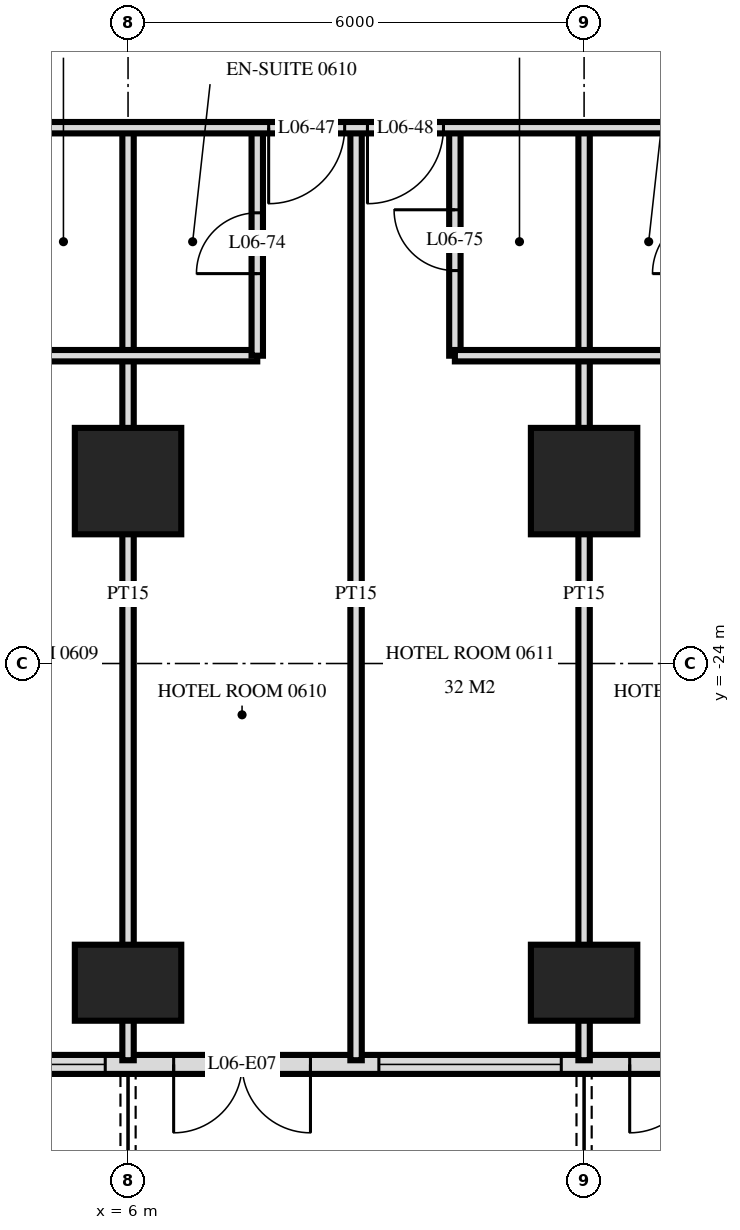
"""IFC4 building model, lengths in metres.
Left out: names, types, materials, properties, quantities, classifications, styles, units other than length and angle.
Written with IfcOpenShell. Run it as: python <this file> out.ifc"""

import sys

from ifc_helpers import new_model, si_unit, direction, frame, frame_2d, origin, origin_2d, place, context, subcontext, project, spatial, rectangle, extrude, element, fill, save


model = new_model("IFC4")
c1 = context("Model", 3, precision=1e-05, world=origin(), true_north=direction((0.0, 1.0)))
c2 = subcontext(c1, "Body", "Model", "MODEL_VIEW")
j1 = project(units=[si_unit("LENGTHUNIT", "METRE"), si_unit("PLANEANGLEUNIT", "RADIAN")], contexts=[c1])
p1 = place(None, origin())
s1 = spatial("IfcSite", under=j1, at=p1, CompositionType="ELEMENT")
p2 = place(p1, origin())
s2 = spatial("IfcBuilding", under=s1, at=p2, CompositionType="ELEMENT")
p3 = place(p2, frame((0.0, 0.0, 31.2)))
s3 = spatial("IfcBuildingStorey", under=s2, at=p3, CompositionType="ELEMENT", Elevation=31.2)
p4 = place(p3, frame((6.0, -28.2, 0.0), z_axis=(0.0, 0.0, 1.0), x_axis=(1.0, 0.0, 0.0)))
e1 = element("IfcColumn", 1, at=p4, inside=s3, PredefinedType="COLUMN", context=c2, shape_type="SweptSolid", body=[
    extrude(rectangle(XDim=1.4, YDim=1.0, at=origin_2d()), origin(), (0.0, 0.0, 1.0), 3.6),
])
p5 = place(p3, frame((6.0, -21.6, 0.0), z_axis=(0.0, 0.0, 1.0), x_axis=(1.0, 0.0, 0.0)))
e2 = element("IfcColumn", 2, at=p5, inside=s3, PredefinedType="COLUMN", context=c2, shape_type="SweptSolid", body=[
    extrude(rectangle(XDim=1.4, YDim=1.4, at=origin_2d()), origin(), (0.0, 0.0, 1.0), 3.6),
])
p6 = place(p3, frame((12.0, -28.2, 0.0), z_axis=(0.0, 0.0, 1.0), x_axis=(1.0, 0.0, 0.0)))
e3 = element("IfcColumn", 3, at=p6, inside=s3, PredefinedType="COLUMN", context=c2, shape_type="SweptSolid", body=[
    extrude(rectangle(XDim=1.4, YDim=1.0, at=origin_2d()), origin(), (0.0, 0.0, 1.0), 3.6),
])
p7 = place(p3, frame((12.0, -21.6, 0.0), z_axis=(0.0, 0.0, 1.0), x_axis=(1.0, 0.0, 0.0)))
e4 = element("IfcColumn", 4, at=p7, inside=s3, PredefinedType="COLUMN", context=c2, shape_type="SweptSolid", body=[
    extrude(rectangle(XDim=1.4, YDim=1.4, at=origin_2d()), origin(), (0.0, 0.0, 1.0), 3.6),
])
p8 = place(p3, frame((-28.775, -29.275, 0.0), z_axis=(0.0, 0.0, 1.0), x_axis=(1.0, 0.0, 0.0)))
e5 = element("IfcWall", 5, at=p8, inside=s3, PredefinedType="SOLIDWALL", context=c2, shape_type="SweptSolid", body=[
    extrude(rectangle(XDim=57.551, YDim=0.25, at=frame_2d((28.775, 0.0))), origin(), (0.0, 0.0, 1.0), 3.32),
])
p9 = place(p8, frame((0.575, 0.0, 0.0)))
e6 = element("IfcOpeningElement", 6, at=p9, cuts=e5, PredefinedType="OPENING", context=c2, shape_type="SweptSolid", body=[
    extrude(rectangle(XDim=1.8, YDim=2.4, at=frame_2d((0.9, 1.2))), frame((0.0, 0.135, 0.0), z_axis=(0.0, -1.0, 0.0), x_axis=(1.0, 0.0, 0.0)), (0.0, 0.0, 1.0), 0.27),
])
p10 = place(p8, frame((5.375, 0.0, 0.0)))
e7 = element("IfcOpeningElement", 7, at=p10, cuts=e5, PredefinedType="OPENING", context=c2, shape_type="SweptSolid", body=[
    extrude(rectangle(XDim=1.8, YDim=2.4, at=frame_2d((0.9, 1.2))), frame((0.0, 0.135, 0.0), z_axis=(0.0, -1.0, 0.0), x_axis=(1.0, 0.0, 0.0)), (0.0, 0.0, 1.0), 0.27),
])
p11 = place(p8, frame((8.075, 0.0, 0.3)))
e8 = element("IfcOpeningElement", 8, at=p11, cuts=e5, PredefinedType="OPENING", context=c2, shape_type="SweptSolid", body=[
    extrude(rectangle(XDim=2.4, YDim=2.1, at=frame_2d((1.2, 1.05))), frame((0.0, 0.135, 0.0), z_axis=(0.0, -1.0, 0.0), x_axis=(1.0, 0.0, 0.0)), (0.0, 0.0, 1.0), 0.27),
])
p12 = place(p8, frame((11.375, 0.0, 0.0)))
e9 = element("IfcOpeningElement", 9, at=p12, cuts=e5, PredefinedType="OPENING", context=c2, shape_type="SweptSolid", body=[
    extrude(rectangle(XDim=1.8, YDim=2.4, at=frame_2d((0.9, 1.2))), frame((0.0, 0.135, 0.0), z_axis=(0.0, -1.0, 0.0), x_axis=(1.0, 0.0, 0.0)), (0.0, 0.0, 1.0), 0.27),
])
p13 = place(p8, frame((14.075, 0.0, 0.3)))
e10 = element("IfcOpeningElement", 10, at=p13, cuts=e5, PredefinedType="OPENING", context=c2, shape_type="SweptSolid", body=[
    extrude(rectangle(XDim=2.4, YDim=2.1, at=frame_2d((1.2, 1.05))), frame((0.0, 0.135, 0.0), z_axis=(0.0, -1.0, 0.0), x_axis=(1.0, 0.0, 0.0)), (0.0, 0.0, 1.0), 0.27),
])
p14 = place(p8, frame((17.375, 0.0, 0.0)))
e11 = element("IfcOpeningElement", 11, at=p14, cuts=e5, PredefinedType="OPENING", context=c2, shape_type="SweptSolid", body=[
    extrude(rectangle(XDim=1.8, YDim=2.4, at=frame_2d((0.9, 1.2))), frame((0.0, 0.135, 0.0), z_axis=(0.0, -1.0, 0.0), x_axis=(1.0, 0.0, 0.0)), (0.0, 0.0, 1.0), 0.27),
])
p15 = place(p8, frame((20.075, 0.0, 0.3)))
e12 = element("IfcOpeningElement", 12, at=p15, cuts=e5, PredefinedType="OPENING", context=c2, shape_type="SweptSolid", body=[
    extrude(rectangle(XDim=2.4, YDim=2.1, at=frame_2d((1.2, 1.05))), frame((0.0, 0.135, 0.0), z_axis=(0.0, -1.0, 0.0), x_axis=(1.0, 0.0, 0.0)), (0.0, 0.0, 1.0), 0.27),
])
p16 = place(p8, frame((23.075, 0.0, 0.3)))
e13 = element("IfcOpeningElement", 13, at=p16, cuts=e5, PredefinedType="OPENING", context=c2, shape_type="SweptSolid", body=[
    extrude(rectangle(XDim=2.4, YDim=2.1, at=frame_2d((1.2, 1.05))), frame((0.0, 0.135, 0.0), z_axis=(0.0, -1.0, 0.0), x_axis=(1.0, 0.0, 0.0)), (0.0, 0.0, 1.0), 0.27),
])
p17 = place(p8, frame((26.375, 0.0, 0.0)))
e14 = element("IfcOpeningElement", 14, at=p17, cuts=e5, PredefinedType="OPENING", context=c2, shape_type="SweptSolid", body=[
    extrude(rectangle(XDim=1.8, YDim=2.4, at=frame_2d((0.9, 1.2))), frame((0.0, 0.135, 0.0), z_axis=(0.0, -1.0, 0.0), x_axis=(1.0, 0.0, 0.0)), (0.0, 0.0, 1.0), 0.27),
])
p18 = place(p8, frame((29.375, 0.0, 0.0)))
e15 = element("IfcOpeningElement", 15, at=p18, cuts=e5, PredefinedType="OPENING", context=c2, shape_type="SweptSolid", body=[
    extrude(rectangle(XDim=1.8, YDim=2.4, at=frame_2d((0.9, 1.2))), frame((0.0, 0.135, 0.0), z_axis=(0.0, -1.0, 0.0), x_axis=(1.0, 0.0, 0.0)), (0.0, 0.0, 1.0), 0.27),
])
p19 = place(p8, frame((32.075, 0.0, 0.3)))
e16 = element("IfcOpeningElement", 16, at=p19, cuts=e5, PredefinedType="OPENING", context=c2, shape_type="SweptSolid", body=[
    extrude(rectangle(XDim=2.4, YDim=2.1, at=frame_2d((1.2, 1.05))), frame((0.0, 0.135, 0.0), z_axis=(0.0, -1.0, 0.0), x_axis=(1.0, 0.0, 0.0)), (0.0, 0.0, 1.0), 0.27),
])
p20 = place(p8, frame((35.375, 0.0, 0.0)))
e17 = element("IfcOpeningElement", 17, at=p20, cuts=e5, PredefinedType="OPENING", context=c2, shape_type="SweptSolid", body=[
    extrude(rectangle(XDim=1.8, YDim=2.4, at=frame_2d((0.9, 1.2))), frame((0.0, 0.135, 0.0), z_axis=(0.0, -1.0, 0.0), x_axis=(1.0, 0.0, 0.0)), (0.0, 0.0, 1.0), 0.27),
])
p21 = place(p8, frame((38.075, 0.0, 0.3)))
e18 = element("IfcOpeningElement", 18, at=p21, cuts=e5, PredefinedType="OPENING", context=c2, shape_type="SweptSolid", body=[
    extrude(rectangle(XDim=2.4, YDim=2.1, at=frame_2d((1.2, 1.05))), frame((0.0, 0.135, 0.0), z_axis=(0.0, -1.0, 0.0), x_axis=(1.0, 0.0, 0.0)), (0.0, 0.0, 1.0), 0.27),
])
p22 = place(p8, frame((41.375, 0.0, 0.0)))
e19 = element("IfcOpeningElement", 19, at=p22, cuts=e5, PredefinedType="OPENING", context=c2, shape_type="SweptSolid", body=[
    extrude(rectangle(XDim=1.8, YDim=2.4, at=frame_2d((0.9, 1.2))), frame((0.0, 0.135, 0.0), z_axis=(0.0, -1.0, 0.0), x_axis=(1.0, 0.0, 0.0)), (0.0, 0.0, 1.0), 0.27),
])
p23 = place(p8, frame((44.075, 0.0, 0.3)))
e20 = element("IfcOpeningElement", 20, at=p23, cuts=e5, PredefinedType="OPENING", context=c2, shape_type="SweptSolid", body=[
    extrude(rectangle(XDim=2.4, YDim=2.1, at=frame_2d((1.2, 1.05))), frame((0.0, 0.135, 0.0), z_axis=(0.0, -1.0, 0.0), x_axis=(1.0, 0.0, 0.0)), (0.0, 0.0, 1.0), 0.27),
])
p24 = place(p8, frame((47.075, 0.0, 0.3)))
e21 = element("IfcOpeningElement", 21, at=p24, cuts=e5, PredefinedType="OPENING", context=c2, shape_type="SweptSolid", body=[
    extrude(rectangle(XDim=2.4, YDim=2.1, at=frame_2d((1.2, 1.05))), frame((0.0, 0.135, 0.0), z_axis=(0.0, -1.0, 0.0), x_axis=(1.0, 0.0, 0.0)), (0.0, 0.0, 1.0), 0.27),
])
p25 = place(p8, frame((50.375, 0.0, 0.0)))
e22 = element("IfcOpeningElement", 22, at=p25, cuts=e5, PredefinedType="OPENING", context=c2, shape_type="SweptSolid", body=[
    extrude(rectangle(XDim=1.8, YDim=2.4, at=frame_2d((0.9, 1.2))), frame((0.0, 0.135, 0.0), z_axis=(0.0, -1.0, 0.0), x_axis=(1.0, 0.0, 0.0)), (0.0, 0.0, 1.0), 0.27),
])
p26 = place(p8, frame((53.375, 0.0, 0.0)))
e23 = element("IfcOpeningElement", 23, at=p26, cuts=e5, PredefinedType="OPENING", context=c2, shape_type="SweptSolid", body=[
    extrude(rectangle(XDim=1.8, YDim=2.4, at=frame_2d((0.9, 1.2))), frame((0.0, 0.135, 0.0), z_axis=(0.0, -1.0, 0.0), x_axis=(1.0, 0.0, 0.0)), (0.0, 0.0, 1.0), 0.27),
])
p27 = place(p3, frame((12.0, -29.22, 0.0), z_axis=(0.0, 0.0, 1.0), x_axis=(0.0, 1.0, 0.0)))
e24 = element("IfcWall", 24, at=p27, inside=s3, PredefinedType="PARTITIONING", context=c2, shape_type="SweptSolid", body=[
    extrude(rectangle(XDim=12.27, YDim=0.15, at=frame_2d((6.135, 0.0))), origin(), (0.0, 0.0, 1.0), 3.32),
])
p28 = place(p3, frame((10.3, -19.95, 0.0), z_axis=(0.0, 0.0, 1.0), x_axis=(0.0, 1.0, 0.0)))
e25 = element("IfcWall", 25, at=p28, inside=s3, PredefinedType="PARTITIONING", context=c2, shape_type="SweptSolid", body=[
    extrude(rectangle(XDim=3.0, YDim=0.15, at=frame_2d((1.5, 0.0))), origin(), (0.0, 0.0, 1.0), 3.32),
])
p29 = place(p28, frame((1.12, 0.0, 0.0)))
e26 = element("IfcOpeningElement", 26, at=p29, cuts=e25, PredefinedType="OPENING", context=c2, shape_type="SweptSolid", body=[
    extrude(rectangle(XDim=0.8, YDim=2.1, at=frame_2d((0.4, 1.05))), frame((0.0, 0.085, 0.0), z_axis=(0.0, -1.0, 0.0), x_axis=(1.0, 0.0, 0.0)), (0.0, 0.0, 1.0), 0.17),
])
p30 = place(p3, frame((9.0, -29.22, 0.0), z_axis=(0.0, 0.0, 1.0), x_axis=(0.0, 1.0, 0.0)))
e27 = element("IfcWall", 27, at=p30, inside=s3, PredefinedType="PARTITIONING", context=c2, shape_type="SweptSolid", body=[
    extrude(rectangle(XDim=12.27, YDim=0.15, at=frame_2d((6.135, 0.0))), origin(), (0.0, 0.0, 1.0), 3.32),
])
p31 = place(p3, frame((7.7, -19.95, 0.0), z_axis=(0.0, 0.0, 1.0), x_axis=(0.0, 1.0, 0.0)))
e28 = element("IfcWall", 28, at=p31, inside=s3, PredefinedType="PARTITIONING", context=c2, shape_type="SweptSolid", body=[
    extrude(rectangle(XDim=3.0, YDim=0.15, at=frame_2d((1.5, 0.0))), origin(), (0.0, 0.0, 1.0), 3.32),
])
p32 = place(p31, frame((1.08, 0.0, 0.0)))
e29 = element("IfcOpeningElement", 29, at=p32, cuts=e28, PredefinedType="OPENING", context=c2, shape_type="SweptSolid", body=[
    extrude(rectangle(XDim=0.8, YDim=2.1, at=frame_2d((0.4, 1.05))), frame((0.0, 0.085, 0.0), z_axis=(0.0, -1.0, 0.0), x_axis=(1.0, 0.0, 0.0)), (0.0, 0.0, 1.0), 0.17),
])
p33 = place(p3, frame((6.0, -29.22, 0.0), z_axis=(0.0, 0.0, 1.0), x_axis=(0.0, 1.0, 0.0)))
e30 = element("IfcWall", 30, at=p33, inside=s3, PredefinedType="PARTITIONING", context=c2, shape_type="SweptSolid", body=[
    extrude(rectangle(XDim=12.27, YDim=0.15, at=frame_2d((6.135, 0.0))), origin(), (0.0, 0.0, 1.0), 3.32),
])
for number, where, z_axis, x_axis in (
    (31, (4.3, -19.95, 0.0), (0.0, 0.0, 1.0), (1.0, 0.0, 0.0)),
    (32, (10.3, -19.95, 0.0), (0.0, 0.0, 1.0), (1.0, 0.0, 0.0)),
):
    element("IfcWall", number, at=place(p3, frame(where, z_axis=z_axis, x_axis=x_axis)), inside=s3, PredefinedType="PARTITIONING", context=c2, shape_type="SweptSolid", body=[
        extrude(rectangle(XDim=3.4, YDim=0.15, at=frame_2d((1.7, 0.0))), origin(), (0.0, 0.0, 1.0), 3.32),
    ])
p34 = place(p3, frame((-33.12, -16.95, 0.0), z_axis=(0.0, 0.0, 1.0), x_axis=(1.0, 0.0, 0.0)))
e33 = element("IfcWall", 33, at=p34, inside=s3, PredefinedType="PARTITIONING", context=c2, shape_type="SweptSolid", body=[
    extrude(rectangle(XDim=66.24, YDim=0.15, at=frame_2d((33.12, 0.0))), origin(), (0.0, 0.0, 1.0), 3.32),
])
p35 = place(p34, frame((9.27, 0.0, 0.0)))
e34 = element("IfcOpeningElement", 34, at=p35, cuts=e33, PredefinedType="OPENING", context=c2, shape_type="SweptSolid", body=[
    extrude(rectangle(XDim=1.0, YDim=2.1, at=frame_2d((0.5, 1.05))), frame((0.0, 0.085, 0.0), z_axis=(0.0, -1.0, 0.0), x_axis=(1.0, 0.0, 0.0)), (0.0, 0.0, 1.0), 0.17),
])
p36 = place(p34, frame((13.97, 0.0, 0.0)))
e35 = element("IfcOpeningElement", 35, at=p36, cuts=e33, PredefinedType="OPENING", context=c2, shape_type="SweptSolid", body=[
    extrude(rectangle(XDim=1.0, YDim=2.1, at=frame_2d((0.5, 1.05))), frame((0.0, 0.085, 0.0), z_axis=(0.0, -1.0, 0.0), x_axis=(1.0, 0.0, 0.0)), (0.0, 0.0, 1.0), 0.17),
])
p37 = place(p34, frame((15.27, 0.0, 0.0)))
e36 = element("IfcOpeningElement", 36, at=p37, cuts=e33, PredefinedType="OPENING", context=c2, shape_type="SweptSolid", body=[
    extrude(rectangle(XDim=1.0, YDim=2.1, at=frame_2d((0.5, 1.05))), frame((0.0, 0.085, 0.0), z_axis=(0.0, -1.0, 0.0), x_axis=(1.0, 0.0, 0.0)), (0.0, 0.0, 1.0), 0.17),
])
p38 = place(p34, frame((19.97, 0.0, 0.0)))
e37 = element("IfcOpeningElement", 37, at=p38, cuts=e33, PredefinedType="OPENING", context=c2, shape_type="SweptSolid", body=[
    extrude(rectangle(XDim=1.0, YDim=2.1, at=frame_2d((0.5, 1.05))), frame((0.0, 0.085, 0.0), z_axis=(0.0, -1.0, 0.0), x_axis=(1.0, 0.0, 0.0)), (0.0, 0.0, 1.0), 0.17),
])
p39 = place(p34, frame((22.27, 0.0, 0.0)))
e38 = element("IfcOpeningElement", 38, at=p39, cuts=e33, PredefinedType="OPENING", context=c2, shape_type="SweptSolid", body=[
    extrude(rectangle(XDim=1.0, YDim=2.1, at=frame_2d((0.5, 1.05))), frame((0.0, 0.085, 0.0), z_axis=(0.0, -1.0, 0.0), x_axis=(1.0, 0.0, 0.0)), (0.0, 0.0, 1.0), 0.17),
])
p40 = place(p34, frame((28.97, 0.0, 0.0)))
e39 = element("IfcOpeningElement", 39, at=p40, cuts=e33, PredefinedType="OPENING", context=c2, shape_type="SweptSolid", body=[
    extrude(rectangle(XDim=1.0, YDim=2.1, at=frame_2d((0.5, 1.05))), frame((0.0, 0.085, 0.0), z_axis=(0.0, -1.0, 0.0), x_axis=(1.0, 0.0, 0.0)), (0.0, 0.0, 1.0), 0.17),
])
p41 = place(p34, frame((30.27, 0.0, 0.0)))
e40 = element("IfcOpeningElement", 40, at=p41, cuts=e33, PredefinedType="OPENING", context=c2, shape_type="SweptSolid", body=[
    extrude(rectangle(XDim=1.0, YDim=2.1, at=frame_2d((0.5, 1.05))), frame((0.0, 0.085, 0.0), z_axis=(0.0, -1.0, 0.0), x_axis=(1.0, 0.0, 0.0)), (0.0, 0.0, 1.0), 0.17),
])
p42 = place(p34, frame((34.97, 0.0, 0.0)))
e41 = element("IfcOpeningElement", 41, at=p42, cuts=e33, PredefinedType="OPENING", context=c2, shape_type="SweptSolid", body=[
    extrude(rectangle(XDim=1.0, YDim=2.1, at=frame_2d((0.5, 1.05))), frame((0.0, 0.085, 0.0), z_axis=(0.0, -1.0, 0.0), x_axis=(1.0, 0.0, 0.0)), (0.0, 0.0, 1.0), 0.17),
])
p43 = place(p34, frame((36.27, 0.0, 0.0)))
e42 = element("IfcOpeningElement", 42, at=p43, cuts=e33, PredefinedType="OPENING", context=c2, shape_type="SweptSolid", body=[
    extrude(rectangle(XDim=1.0, YDim=2.1, at=frame_2d((0.5, 1.05))), frame((0.0, 0.085, 0.0), z_axis=(0.0, -1.0, 0.0), x_axis=(1.0, 0.0, 0.0)), (0.0, 0.0, 1.0), 0.17),
])
p44 = place(p34, frame((40.97, 0.0, 0.0)))
e43 = element("IfcOpeningElement", 43, at=p44, cuts=e33, PredefinedType="OPENING", context=c2, shape_type="SweptSolid", body=[
    extrude(rectangle(XDim=1.0, YDim=2.1, at=frame_2d((0.5, 1.05))), frame((0.0, 0.085, 0.0), z_axis=(0.0, -1.0, 0.0), x_axis=(1.0, 0.0, 0.0)), (0.0, 0.0, 1.0), 0.17),
])
p45 = place(p34, frame((42.27, 0.0, 0.0)))
e44 = element("IfcOpeningElement", 44, at=p45, cuts=e33, PredefinedType="OPENING", context=c2, shape_type="SweptSolid", body=[
    extrude(rectangle(XDim=1.0, YDim=2.1, at=frame_2d((0.5, 1.05))), frame((0.0, 0.085, 0.0), z_axis=(0.0, -1.0, 0.0), x_axis=(1.0, 0.0, 0.0)), (0.0, 0.0, 1.0), 0.17),
])
p46 = place(p34, frame((46.97, 0.0, 0.0)))
e45 = element("IfcOpeningElement", 45, at=p46, cuts=e33, PredefinedType="OPENING", context=c2, shape_type="SweptSolid", body=[
    extrude(rectangle(XDim=1.0, YDim=2.1, at=frame_2d((0.5, 1.05))), frame((0.0, 0.085, 0.0), z_axis=(0.0, -1.0, 0.0), x_axis=(1.0, 0.0, 0.0)), (0.0, 0.0, 1.0), 0.17),
])
p47 = place(p34, frame((48.27, 0.0, 0.0)))
e46 = element("IfcOpeningElement", 46, at=p47, cuts=e33, PredefinedType="OPENING", context=c2, shape_type="SweptSolid", body=[
    extrude(rectangle(XDim=1.0, YDim=2.1, at=frame_2d((0.5, 1.05))), frame((0.0, 0.085, 0.0), z_axis=(0.0, -1.0, 0.0), x_axis=(1.0, 0.0, 0.0)), (0.0, 0.0, 1.0), 0.17),
])
p48 = place(p34, frame((52.97, 0.0, 0.0)))
e47 = element("IfcOpeningElement", 47, at=p48, cuts=e33, PredefinedType="OPENING", context=c2, shape_type="SweptSolid", body=[
    extrude(rectangle(XDim=1.0, YDim=2.1, at=frame_2d((0.5, 1.05))), frame((0.0, 0.085, 0.0), z_axis=(0.0, -1.0, 0.0), x_axis=(1.0, 0.0, 0.0)), (0.0, 0.0, 1.0), 0.17),
])
p49 = place(p34, frame((54.27, 0.0, 0.0)))
e48 = element("IfcOpeningElement", 48, at=p49, cuts=e33, PredefinedType="OPENING", context=c2, shape_type="SweptSolid", body=[
    extrude(rectangle(XDim=1.0, YDim=2.1, at=frame_2d((0.5, 1.05))), frame((0.0, 0.085, 0.0), z_axis=(0.0, -1.0, 0.0), x_axis=(1.0, 0.0, 0.0)), (0.0, 0.0, 1.0), 0.17),
])
p50 = place(p34, frame((4.4, 0.0, 0.0)))
e49 = element("IfcOpeningElement", 49, at=p50, cuts=e33, PredefinedType="OPENING", context=c2, shape_type="SweptSolid", body=[
    extrude(rectangle(XDim=1.0, YDim=2.1, at=frame_2d((0.5, 1.05))), frame((0.0, 0.085, 0.0), z_axis=(0.0, -1.0, 0.0), x_axis=(1.0, 0.0, 0.0)), (0.0, 0.0, 1.0), 0.17),
])
p51 = place(p34, frame((60.8, 0.0, 0.0)))
e50 = element("IfcOpeningElement", 50, at=p51, cuts=e33, PredefinedType="OPENING", context=c2, shape_type="SweptSolid", body=[
    extrude(rectangle(XDim=1.0, YDim=2.1, at=frame_2d((0.5, 1.05))), frame((0.0, 0.085, 0.0), z_axis=(0.0, -1.0, 0.0), x_axis=(1.0, 0.0, 0.0)), (0.0, 0.0, 1.0), 0.17),
])
p52 = place(p19, origin())
e51 = element("IfcWindow", 51, at=p52, inside=s3, PartitioningType="SINGLE_PANEL", PredefinedType="WINDOW", context=c2, shape_type="SweptSolid", body=[
    extrude(rectangle(XDim=2.4, YDim=2.1, at=frame_2d((1.2, 1.05))), frame((0.0, 0.03, 0.0), z_axis=(0.0, -1.0, 0.0), x_axis=(1.0, 0.0, 0.0)), (0.0, 0.0, 1.0), 0.06),
])
fill(e16, e51)
p53 = place(p20, frame((0.9, 0.0, 0.0), z_axis=(0.0, 0.0, 1.0), x_axis=(-1.0, 0.0, 0.0)))
e52 = element("IfcDoor", 52, at=p53, inside=s3, OperationType="DOUBLE_DOOR_SINGLE_SWING", PredefinedType="DOOR", context=c2, shape_type="SweptSolid", body=[
    extrude(rectangle(XDim=1.8, YDim=2.4, at=frame_2d((0.0, 1.2))), frame((0.0, -0.025, 0.0), z_axis=(0.0, 1.0, 0.0), x_axis=(-1.0, 0.0, 0.0)), (0.0, 0.0, 1.0), 0.05),
])
fill(e17, e52)
p54 = place(p21, origin())
e53 = element("IfcWindow", 53, at=p54, inside=s3, PartitioningType="SINGLE_PANEL", PredefinedType="WINDOW", context=c2, shape_type="SweptSolid", body=[
    extrude(rectangle(XDim=2.4, YDim=2.1, at=frame_2d((1.2, 1.05))), frame((0.0, 0.03, 0.0), z_axis=(0.0, -1.0, 0.0), x_axis=(1.0, 0.0, 0.0)), (0.0, 0.0, 1.0), 0.06),
])
fill(e18, e53)
p55 = place(p22, frame((0.9, 0.0, 0.0), z_axis=(0.0, 0.0, 1.0), x_axis=(-1.0, 0.0, 0.0)))
e54 = element("IfcDoor", 54, at=p55, inside=s3, OperationType="DOUBLE_DOOR_SINGLE_SWING", PredefinedType="DOOR", context=c2, shape_type="SweptSolid", body=[
    extrude(rectangle(XDim=1.8, YDim=2.4, at=frame_2d((0.0, 1.2))), frame((0.0, -0.025, 0.0), z_axis=(0.0, 1.0, 0.0), x_axis=(-1.0, 0.0, 0.0)), (0.0, 0.0, 1.0), 0.05),
])
fill(e19, e54)
p56 = place(p44, frame((0.5, 0.0, 0.0), z_axis=(0.0, 0.0, 1.0), x_axis=(-1.0, 0.0, 0.0)))
e55 = element("IfcDoor", 55, at=p56, inside=s3, OperationType="SINGLE_SWING_LEFT", PredefinedType="DOOR", context=c2, shape_type="SweptSolid", body=[
    extrude(rectangle(XDim=1.0, YDim=2.1, at=frame_2d((0.0, 1.05))), frame((0.0, -0.025, 0.0), z_axis=(0.0, 1.0, 0.0), x_axis=(-1.0, 0.0, 0.0)), (0.0, 0.0, 1.0), 0.05),
])
fill(e43, e55)
p57 = place(p45, frame((0.5, 0.0, 0.0), z_axis=(0.0, 0.0, 1.0), x_axis=(-1.0, 0.0, 0.0)))
e56 = element("IfcDoor", 56, at=p57, inside=s3, OperationType="SINGLE_SWING_LEFT", PredefinedType="DOOR", context=c2, shape_type="SweptSolid", body=[
    extrude(rectangle(XDim=1.0, YDim=2.1, at=frame_2d((0.0, 1.05))), frame((0.0, -0.025, 0.0), z_axis=(0.0, 1.0, 0.0), x_axis=(-1.0, 0.0, 0.0)), (0.0, 0.0, 1.0), 0.05),
])
fill(e44, e56)
p58 = place(p32, origin())
e57 = element("IfcDoor", 57, at=p58, inside=s3, OperationType="SINGLE_SWING_RIGHT", PredefinedType="DOOR", context=c2, shape_type="SweptSolid", body=[
    extrude(rectangle(XDim=0.8, YDim=2.1, at=frame_2d((0.4, 1.05))), frame((0.0, 0.025, 0.0), z_axis=(0.0, -1.0, 0.0), x_axis=(1.0, 0.0, 0.0)), (0.0, 0.0, 1.0), 0.05),
])
fill(e29, e57)
p59 = place(p29, origin())
e58 = element("IfcDoor", 58, at=p59, inside=s3, OperationType="SINGLE_SWING_LEFT", PredefinedType="DOOR", context=c2, shape_type="SweptSolid", body=[
    extrude(rectangle(XDim=0.8, YDim=2.1, at=frame_2d((0.4, 1.05))), frame((0.0, 0.025, 0.0), z_axis=(0.0, -1.0, 0.0), x_axis=(1.0, 0.0, 0.0)), (0.0, 0.0, 1.0), 0.05),
])
fill(e26, e58)
save(model, sys.argv[1])
